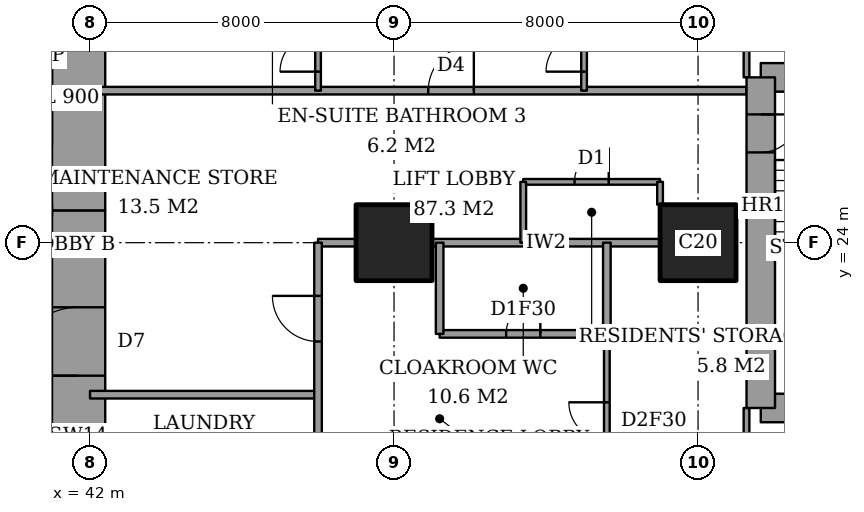
"""IFC4 building model, lengths in metres.
Left out: names, types, materials, properties, quantities, classifications, styles, units other than length and angle.
Written with IfcOpenShell. Run it as: python <this file> out.ifc"""

import sys

from ifc_helpers import new_model, si_unit, direction, frame, frame_2d, origin, origin_2d, place, context, subcontext, project, spatial, rectangle, extrude, element, fill, save


model = new_model("IFC4")
c1 = context("Model", 3, precision=1e-05, world=origin(), true_north=direction((0.0, 1.0)))
c2 = subcontext(c1, "Body", "Model", "MODEL_VIEW")
j1 = project(units=[si_unit("LENGTHUNIT", "METRE"), si_unit("PLANEANGLEUNIT", "RADIAN")], contexts=[c1])
p1 = place(None, origin())
s1 = spatial("IfcSite", under=j1, at=p1, CompositionType="ELEMENT")
p2 = place(p1, origin())
s2 = spatial("IfcBuilding", under=s1, at=p2, CompositionType="ELEMENT")
p3 = place(p2, frame((0.0, 0.0, 117.8)))
s3 = spatial("IfcBuildingStorey", under=s2, at=p3, CompositionType="ELEMENT", Elevation=117.8)
for number, where, z_axis, x_axis in (
    (1, (50.0, 24.0, 0.0), (0.0, 0.0, 1.0), (1.0, 0.0, 0.0)),
    (2, (58.0, 24.0, 0.0), (0.0, 0.0, 1.0), (1.0, 0.0, 0.0)),
):
    element("IfcColumn", number, at=place(p3, frame(where, z_axis=z_axis, x_axis=x_axis)), inside=s3, PredefinedType="COLUMN", context=c2, shape_type="SweptSolid", body=[
        extrude(rectangle(XDim=2.0, YDim=2.0, at=origin_2d()), origin(), (0.0, 0.0, 1.0), 3.6),
    ])
p4 = place(p3, frame((41.7, 13.0, 0.0), z_axis=(0.0, 0.0, 1.0), x_axis=(0.0, 1.0, 0.0)))
e3 = element("IfcWall", 3, at=p4, inside=s3, PredefinedType="SHEAR", context=c2, shape_type="SweptSolid", body=[
    extrude(rectangle(XDim=11.85, YDim=1.4, at=frame_2d((5.925, 0.0))), origin(), (0.0, 0.0, 1.0), 3.6),
])
p5 = place(p4, frame((7.5, 0.0, 0.0)))
e4 = element("IfcOpeningElement", 4, at=p5, cuts=e3, PredefinedType="OPENING", context=c2, shape_type="SweptSolid", body=[
    extrude(rectangle(XDim=1.8, YDim=2.4, at=frame_2d((0.9, 1.2))), frame((0.0, 0.71, 0.0), z_axis=(0.0, -1.0, 0.0), x_axis=(1.0, 0.0, 0.0)), (0.0, 0.0, 1.0), 1.42),
])
p6 = place(p3, frame((41.7, 24.85, 0.0), z_axis=(0.0, 0.0, 1.0), x_axis=(0.0, 1.0, 0.0)))
e5 = element("IfcWall", 5, at=p6, inside=s3, PredefinedType="SHEAR", context=c2, shape_type="SweptSolid", body=[
    extrude(rectangle(XDim=10.15, YDim=1.4, at=frame_2d((5.075, 0.0))), origin(), (0.0, 0.0, 1.0), 3.6),
])
for number, where, z_axis, x_axis in (
    (6, (59.65, 19.65, 0.0), (0.0, 0.0, 1.0), (1.0, 0.0, 0.0)),
    (7, (64.1, 28.35, 0.0), (0.0, 0.0, 1.0), (-1.0, 0.0, 0.0)),
):
    element("IfcWall", number, at=place(p3, frame(where, z_axis=z_axis, x_axis=x_axis)), inside=s3, PredefinedType="SHEAR", context=c2, shape_type="SweptSolid", body=[
        extrude(rectangle(XDim=4.45, YDim=0.75, at=frame_2d((2.225, 0.0))), origin(), (0.0, 0.0, 1.0), 3.6),
    ])
p7 = place(p3, frame((59.65, 28.35, 0.0), z_axis=(0.0, 0.0, 1.0), x_axis=(0.0, -1.0, 0.0)))
e8 = element("IfcWall", 8, at=p7, inside=s3, PredefinedType="SHEAR", context=c2, shape_type="SweptSolid", body=[
    extrude(rectangle(XDim=8.7, YDim=0.75, at=frame_2d((4.35, 0.0))), origin(), (0.0, 0.0, 1.0), 3.6),
])
p8 = place(p7, frame((0.975, 0.0, 0.0)))
e9 = element("IfcOpeningElement", 9, at=p8, cuts=e8, PredefinedType="OPENING", context=c2, shape_type="SweptSolid", body=[
    extrude(rectangle(XDim=1.0, YDim=2.1, at=frame_2d((0.5, 1.05))), frame((0.0, 0.385, 0.0), z_axis=(0.0, -1.0, 0.0), x_axis=(1.0, 0.0, 0.0)), (0.0, 0.0, 1.0), 0.77),
])
p9 = place(p3, frame((42.0, 20.0, 0.0), z_axis=(0.0, 0.0, 1.0), x_axis=(1.0, 0.0, 0.0)))
e10 = element("IfcWall", 10, at=p9, inside=s3, PredefinedType="PARTITIONING", context=c2, shape_type="SweptSolid", body=[
    extrude(rectangle(XDim=6.0, YDim=0.2, at=frame_2d((3.0, 0.0))), origin(), (0.0, 0.0, 1.0), 3.35),
])
p10 = place(p3, frame((51.2, 21.6, 0.0), z_axis=(0.0, 0.0, 1.0), x_axis=(1.0, 0.0, 0.0)))
e11 = element("IfcWall", 11, at=p10, inside=s3, PredefinedType="PARTITIONING", context=c2, shape_type="SweptSolid", body=[
    extrude(rectangle(XDim=4.4, YDim=0.2, at=frame_2d((2.2, 0.0))), origin(), (0.0, 0.0, 1.0), 3.35),
])
p11 = place(p10, frame((1.75, 0.0, 0.0)))
e12 = element("IfcOpeningElement", 12, at=p11, cuts=e11, PredefinedType="OPENING", context=c2, shape_type="SweptSolid", body=[
    extrude(rectangle(XDim=0.9, YDim=2.1, at=frame_2d((0.45, 1.05))), frame((0.0, 0.11, 0.0), z_axis=(0.0, -1.0, 0.0), x_axis=(1.0, 0.0, 0.0)), (0.0, 0.0, 1.0), 0.22),
])
p12 = place(p3, frame((48.0, 24.0, 0.0), z_axis=(0.0, 0.0, 1.0), x_axis=(1.0, 0.0, 0.0)))
e13 = element("IfcWall", 13, at=p12, inside=s3, PredefinedType="PARTITIONING", context=c2, shape_type="SweptSolid", body=[
    extrude(rectangle(XDim=1.0, YDim=0.2, at=frame_2d((0.5, 0.0))), origin(), (0.0, 0.0, 1.0), 3.35),
])
p13 = place(p3, frame((51.0, 24.0, 0.0), z_axis=(0.0, 0.0, 1.0), x_axis=(1.0, 0.0, 0.0)))
e14 = element("IfcWall", 14, at=p13, inside=s3, PredefinedType="PARTITIONING", context=c2, shape_type="SweptSolid", body=[
    extrude(rectangle(XDim=6.0, YDim=0.2, at=frame_2d((3.0, 0.0))), origin(), (0.0, 0.0, 1.0), 3.35),
])
p14 = place(p3, frame((53.4, 25.6, 0.0), z_axis=(0.0, 0.0, 1.0), x_axis=(1.0, 0.0, 0.0)))
e15 = element("IfcWall", 15, at=p14, inside=s3, PredefinedType="PARTITIONING", context=c2, shape_type="SweptSolid", body=[
    extrude(rectangle(XDim=3.6, YDim=0.15, at=frame_2d((1.8, 0.0))), origin(), (0.0, 0.0, 1.0), 3.35),
])
p15 = place(p14, frame((1.35, 0.0, 0.0)))
e16 = element("IfcOpeningElement", 16, at=p15, cuts=e15, PredefinedType="OPENING", context=c2, shape_type="SweptSolid", body=[
    extrude(rectangle(XDim=0.9, YDim=2.1, at=frame_2d((0.45, 1.05))), frame((0.0, 0.085, 0.0), z_axis=(0.0, -1.0, 0.0), x_axis=(1.0, 0.0, 0.0)), (0.0, 0.0, 1.0), 0.17),
])
p16 = place(p3, frame((42.0, 28.0, 0.0), z_axis=(0.0, 0.0, 1.0), x_axis=(1.0, 0.0, 0.0)))
e17 = element("IfcWall", 17, at=p16, inside=s3, PredefinedType="PARTITIONING", context=c2, shape_type="SweptSolid", body=[
    extrude(rectangle(XDim=17.275, YDim=0.2, at=frame_2d((8.637, 0.0))), origin(), (0.0, 0.0, 1.0), 3.35),
])
p17 = place(p16, frame((8.9, 0.0, 0.0)))
e18 = element("IfcOpeningElement", 18, at=p17, cuts=e17, PredefinedType="OPENING", context=c2, shape_type="SweptSolid", body=[
    extrude(rectangle(XDim=1.2, YDim=2.4, at=frame_2d((0.6, 1.2))), frame((0.0, 0.11, 0.0), z_axis=(0.0, -1.0, 0.0), x_axis=(1.0, 0.0, 0.0)), (0.0, 0.0, 1.0), 0.22),
])
p18 = place(p3, frame((48.0, 17.0, 0.0), z_axis=(0.0, 0.0, 1.0), x_axis=(0.0, 1.0, 0.0)))
e19 = element("IfcWall", 19, at=p18, inside=s3, PredefinedType="PARTITIONING", context=c2, shape_type="SweptSolid", body=[
    extrude(rectangle(XDim=7.0, YDim=0.2, at=frame_2d((3.5, 0.0))), origin(), (0.0, 0.0, 1.0), 3.35),
])
p19 = place(p18, frame((4.4, 0.0, 0.0)))
e20 = element("IfcOpeningElement", 20, at=p19, cuts=e19, PredefinedType="OPENING", context=c2, shape_type="SweptSolid", body=[
    extrude(rectangle(XDim=1.2, YDim=2.4, at=frame_2d((0.6, 1.2))), frame((0.0, 0.11, 0.0), z_axis=(0.0, -1.0, 0.0), x_axis=(1.0, 0.0, 0.0)), (0.0, 0.0, 1.0), 0.22),
])
p20 = place(p18, frame((1.05, 0.0, 0.0)))
e21 = element("IfcOpeningElement", 21, at=p20, cuts=e19, PredefinedType="OPENING", context=c2, shape_type="SweptSolid", body=[
    extrude(rectangle(XDim=0.9, YDim=2.1, at=frame_2d((0.45, 1.05))), frame((0.0, 0.11, 0.0), z_axis=(0.0, -1.0, 0.0), x_axis=(1.0, 0.0, 0.0)), (0.0, 0.0, 1.0), 0.22),
])
p21 = place(p3, frame((48.0, 28.0, 0.0), z_axis=(0.0, 0.0, 1.0), x_axis=(0.0, 1.0, 0.0)))
e22 = element("IfcWall", 22, at=p21, inside=s3, PredefinedType="PARTITIONING", context=c2, shape_type="SweptSolid", body=[
    extrude(rectangle(XDim=9.4, YDim=0.15, at=frame_2d((4.7, 0.0))), origin(), (0.0, 0.0, 1.0), 3.35),
])
p22 = place(p21, frame((0.5, 0.0, 0.0)))
e23 = element("IfcOpeningElement", 23, at=p22, cuts=e22, PredefinedType="OPENING", context=c2, shape_type="SweptSolid", body=[
    extrude(rectangle(XDim=1.0, YDim=2.1, at=frame_2d((0.5, 1.05))), frame((0.0, 0.085, 0.0), z_axis=(0.0, -1.0, 0.0), x_axis=(1.0, 0.0, 0.0)), (0.0, 0.0, 1.0), 0.17),
])
p23 = place(p3, frame((51.2, 21.6, 0.0), z_axis=(0.0, 0.0, 1.0), x_axis=(0.0, 1.0, 0.0)))
e24 = element("IfcWall", 24, at=p23, inside=s3, PredefinedType="PARTITIONING", context=c2, shape_type="SweptSolid", body=[
    extrude(rectangle(XDim=2.4, YDim=0.2, at=frame_2d((1.2, 0.0))), origin(), (0.0, 0.0, 1.0), 3.35),
])
p24 = place(p3, frame((53.4, 24.0, 0.0), z_axis=(0.0, 0.0, 1.0), x_axis=(0.0, 1.0, 0.0)))
e25 = element("IfcWall", 25, at=p24, inside=s3, PredefinedType="PARTITIONING", context=c2, shape_type="SweptSolid", body=[
    extrude(rectangle(XDim=1.6, YDim=0.15, at=frame_2d((0.8, 0.0))), origin(), (0.0, 0.0, 1.0), 3.35),
])
p25 = place(p3, frame((55.0, 28.0, 0.0), z_axis=(0.0, 0.0, 1.0), x_axis=(0.0, 1.0, 0.0)))
e26 = element("IfcWall", 26, at=p25, inside=s3, PredefinedType="PARTITIONING", context=c2, shape_type="SweptSolid", body=[
    extrude(rectangle(XDim=9.4, YDim=0.15, at=frame_2d((4.7, 0.0))), origin(), (0.0, 0.0, 1.0), 3.35),
])
p26 = place(p25, frame((0.5, 0.0, 0.0)))
e27 = element("IfcOpeningElement", 27, at=p26, cuts=e26, PredefinedType="OPENING", context=c2, shape_type="SweptSolid", body=[
    extrude(rectangle(XDim=1.0, YDim=2.1, at=frame_2d((0.5, 1.05))), frame((0.0, 0.085, 0.0), z_axis=(0.0, -1.0, 0.0), x_axis=(1.0, 0.0, 0.0)), (0.0, 0.0, 1.0), 0.17),
])
p27 = place(p3, frame((55.6, 21.6, 0.0), z_axis=(0.0, 0.0, 1.0), x_axis=(0.0, 1.0, 0.0)))
e28 = element("IfcWall", 28, at=p27, inside=s3, PredefinedType="PARTITIONING", context=c2, shape_type="SweptSolid", body=[
    extrude(rectangle(XDim=2.4, YDim=0.2, at=frame_2d((1.2, 0.0))), origin(), (0.0, 0.0, 1.0), 3.35),
])
p28 = place(p3, frame((55.6, 11.0, 0.0), z_axis=(0.0, 0.0, 1.0), x_axis=(0.0, 1.0, 0.0)))
e29 = element("IfcWall", 29, at=p28, inside=s3, PredefinedType="PARTITIONING", context=c2, shape_type="SweptSolid", body=[
    extrude(rectangle(XDim=10.6, YDim=0.15, at=frame_2d((5.3, 0.0))), origin(), (0.0, 0.0, 1.0), 3.35),
])
p29 = place(p28, frame((7.8, 0.0, 0.0)))
e30 = element("IfcOpeningElement", 30, at=p29, cuts=e29, PredefinedType="OPENING", context=c2, shape_type="SweptSolid", body=[
    extrude(rectangle(XDim=1.0, YDim=2.1, at=frame_2d((0.5, 1.05))), frame((0.0, 0.085, 0.0), z_axis=(0.0, -1.0, 0.0), x_axis=(1.0, 0.0, 0.0)), (0.0, 0.0, 1.0), 0.17),
])
p30 = place(p3, frame((57.0, 25.0, 0.0), z_axis=(0.0, 0.0, 1.0), x_axis=(0.0, 1.0, 0.0)))
e31 = element("IfcWall", 31, at=p30, inside=s3, PredefinedType="PARTITIONING", context=c2, shape_type="SweptSolid", body=[
    extrude(rectangle(XDim=0.6, YDim=0.15, at=frame_2d((0.3, 0.0))), origin(), (0.0, 0.0, 1.0), 3.35),
])
p31 = place(p3, frame((59.275, 17.2, 0.0), z_axis=(0.0, 0.0, 1.0), x_axis=(0.0, 1.0, 0.0)))
e32 = element("IfcWall", 32, at=p31, inside=s3, PredefinedType="PARTITIONING", context=c2, shape_type="SweptSolid", body=[
    extrude(rectangle(XDim=2.45, YDim=0.15, at=frame_2d((1.225, 0.0))), origin(), (0.0, 0.0, 1.0), 3.35),
])
p32 = place(p31, frame((0.538, 0.0, 0.0)))
e33 = element("IfcOpeningElement", 33, at=p32, cuts=e32, PredefinedType="OPENING", context=c2, shape_type="SweptSolid", body=[
    extrude(rectangle(XDim=1.0, YDim=2.1, at=frame_2d((0.5, 1.05))), frame((0.0, 0.085, 0.0), z_axis=(0.0, -1.0, 0.0), x_axis=(1.0, 0.0, 0.0)), (0.0, 0.0, 1.0), 0.17),
])
p33 = place(p3, frame((59.275, 28.35, 0.0), z_axis=(0.0, 0.0, 1.0), x_axis=(0.0, 1.0, 0.0)))
e34 = element("IfcWall", 34, at=p33, inside=s3, PredefinedType="PARTITIONING", context=c2, shape_type="SweptSolid", body=[
    extrude(rectangle(XDim=2.45, YDim=0.15, at=frame_2d((1.225, 0.0))), origin(), (0.0, 0.0, 1.0), 3.35),
])
p34 = place(p33, frame((0.913, 0.0, 0.0)))
e35 = element("IfcOpeningElement", 35, at=p34, cuts=e34, PredefinedType="OPENING", context=c2, shape_type="SweptSolid", body=[
    extrude(rectangle(XDim=1.0, YDim=2.1, at=frame_2d((0.5, 1.05))), frame((0.0, 0.085, 0.0), z_axis=(0.0, -1.0, 0.0), x_axis=(1.0, 0.0, 0.0)), (0.0, 0.0, 1.0), 0.17),
])
p35 = place(p29, origin())
e36 = element("IfcDoor", 36, at=p35, inside=s3, OperationType="SINGLE_SWING_LEFT", PredefinedType="DOOR", context=c2, shape_type="SweptSolid", body=[
    extrude(rectangle(XDim=1.0, YDim=2.1, at=frame_2d((0.5, 1.05))), frame((0.0, 0.025, 0.0), z_axis=(0.0, -1.0, 0.0), x_axis=(1.0, 0.0, 0.0)), (0.0, 0.0, 1.0), 0.05),
])
fill(e30, e36)
p36 = place(p11, origin())
e37 = element("IfcDoor", 37, at=p36, inside=s3, OperationType="SINGLE_SWING_LEFT", PredefinedType="DOOR", context=c2, shape_type="SweptSolid", body=[
    extrude(rectangle(XDim=0.9, YDim=2.1, at=frame_2d((0.45, 1.05))), frame((0.0, 0.025, 0.0), z_axis=(0.0, -1.0, 0.0), x_axis=(1.0, 0.0, 0.0)), (0.0, 0.0, 1.0), 0.05),
])
fill(e12, e37)
p37 = place(p19, origin())
e38 = element("IfcDoor", 38, at=p37, inside=s3, OperationType="SINGLE_SWING_LEFT", PredefinedType="DOOR", context=c2, shape_type="SweptSolid", body=[
    extrude(rectangle(XDim=1.2, YDim=2.4, at=frame_2d((0.6, 1.2))), frame((0.0, 0.025, 0.0), z_axis=(0.0, -1.0, 0.0), x_axis=(1.0, 0.0, 0.0)), (0.0, 0.0, 1.0), 0.05),
])
fill(e20, e38)
p38 = place(p26, origin())
e39 = element("IfcDoor", 39, at=p38, inside=s3, OperationType="SINGLE_SWING_RIGHT", PredefinedType="DOOR", context=c2, shape_type="SweptSolid", body=[
    extrude(rectangle(XDim=1.0, YDim=2.1, at=frame_2d((0.5, 1.05))), frame((0.0, 0.025, 0.0), z_axis=(0.0, -1.0, 0.0), x_axis=(1.0, 0.0, 0.0)), (0.0, 0.0, 1.0), 0.05),
])
fill(e27, e39)
p39 = place(p17, origin())
e40 = element("IfcDoor", 40, at=p39, inside=s3, OperationType="SINGLE_SWING_LEFT", PredefinedType="DOOR", context=c2, shape_type="SweptSolid", body=[
    extrude(rectangle(XDim=1.2, YDim=2.4, at=frame_2d((0.6, 1.2))), frame((0.0, 0.025, 0.0), z_axis=(0.0, -1.0, 0.0), x_axis=(1.0, 0.0, 0.0)), (0.0, 0.0, 1.0), 0.05),
])
fill(e18, e40)
p40 = place(p22, origin())
e41 = element("IfcDoor", 41, at=p40, inside=s3, OperationType="SINGLE_SWING_RIGHT", PredefinedType="DOOR", context=c2, shape_type="SweptSolid", body=[
    extrude(rectangle(XDim=1.0, YDim=2.1, at=frame_2d((0.5, 1.05))), frame((0.0, 0.025, 0.0), z_axis=(0.0, -1.0, 0.0), x_axis=(1.0, 0.0, 0.0)), (0.0, 0.0, 1.0), 0.05),
])
fill(e23, e41)
p41 = place(p15, origin())
e42 = element("IfcDoor", 42, at=p41, inside=s3, OperationType="SINGLE_SWING_LEFT", PredefinedType="DOOR", context=c2, shape_type="SweptSolid", body=[
    extrude(rectangle(XDim=0.9, YDim=2.1, at=frame_2d((0.45, 1.05))), frame((0.0, 0.025, 0.0), z_axis=(0.0, -1.0, 0.0), x_axis=(1.0, 0.0, 0.0)), (0.0, 0.0, 1.0), 0.05),
])
fill(e16, e42)
p42 = place(p5, origin())
e43 = element("IfcDoor", 43, at=p42, inside=s3, OperationType="DOUBLE_DOOR_DOUBLE_SWING", PredefinedType="DOOR", context=c2, shape_type="SweptSolid", body=[
    extrude(rectangle(XDim=1.8, YDim=2.4, at=frame_2d((0.9, 1.2))), frame((0.0, 0.025, 0.0), z_axis=(0.0, -1.0, 0.0), x_axis=(1.0, 0.0, 0.0)), (0.0, 0.0, 1.0), 0.05),
])
fill(e4, e43)
p43 = place(p8, origin())
e44 = element("IfcDoor", 44, at=p43, inside=s3, OperationType="SINGLE_SWING_RIGHT", PredefinedType="DOOR", context=c2, shape_type="SweptSolid", body=[
    extrude(rectangle(XDim=1.0, YDim=2.1, at=frame_2d((0.5, 1.05))), frame((0.0, 0.025, 0.0), z_axis=(0.0, -1.0, 0.0), x_axis=(1.0, 0.0, 0.0)), (0.0, 0.0, 1.0), 0.05),
])
fill(e9, e44)
save(model, sys.argv[1])
